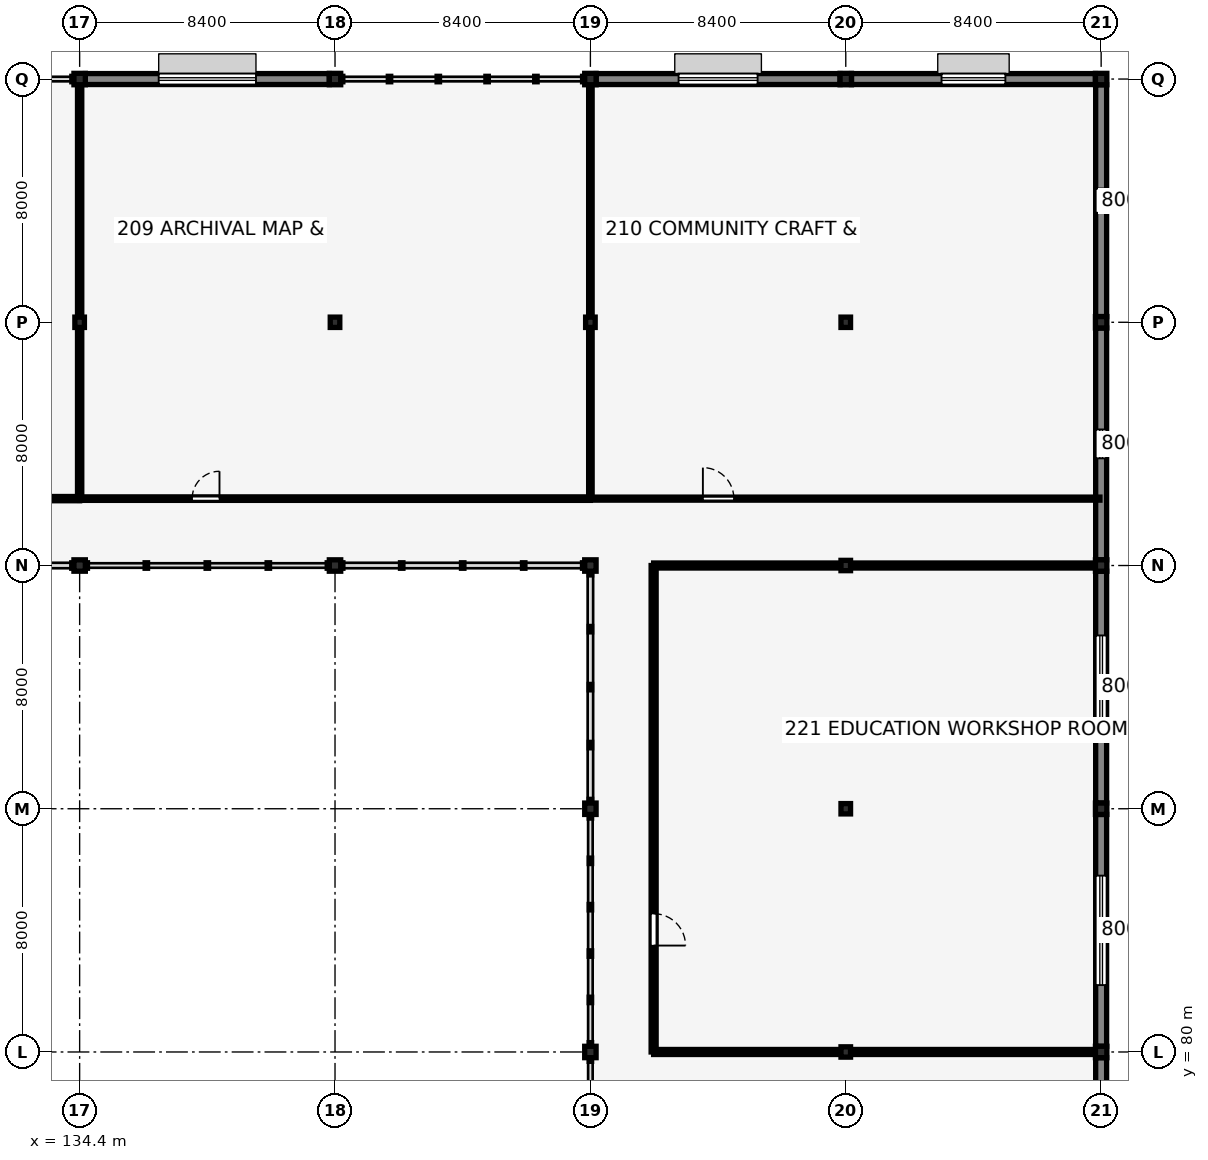
"""IFC4 building model, lengths in metres.
Left out: names, types, materials, properties, quantities, classifications, styles, units other than length and angle.
Written with IfcOpenShell. Run it as: python <this file> out.ifc"""

import sys

from ifc_helpers import new_model, si_unit, direction, frame, frame_2d, origin, origin_2d, place, context, subcontext, project, spatial, rectangle, i_section, extrude, element, fill, save


model = new_model("IFC4")
c1 = context("Model", 3, precision=1e-05, world=origin(), true_north=direction((0.0, 1.0)))
c2 = subcontext(c1, "Body", "Model", "MODEL_VIEW")
j1 = project(units=[si_unit("LENGTHUNIT", "METRE"), si_unit("PLANEANGLEUNIT", "RADIAN")], contexts=[c1])
p1 = place(None, origin())
s1 = spatial("IfcSite", under=j1, at=p1, CompositionType="ELEMENT")
p2 = place(p1, origin())
s2 = spatial("IfcBuilding", under=s1, at=p2, CompositionType="ELEMENT")
p3 = place(p2, frame((0.0, 0.0, 9.52)))
s3 = spatial("IfcBuildingStorey", under=s2, at=p3, CompositionType="ELEMENT", Elevation=9.52)
p4 = place(p3, frame((134.4, 96.0, 0.0), z_axis=(0.0, 0.0, 1.0), x_axis=(1.0, 0.0, 0.0)))
e1 = element("IfcColumn", 1, at=p4, inside=s3, PredefinedType="COLUMN", context=c2, shape_type="SweptSolid", body=[
    extrude(i_section(OverallWidth=0.375, OverallDepth=0.375, WebThickness=0.017, FlangeThickness=0.027, FilletRadius=0.015, at=origin_2d()), origin(), (0.0, 0.0, 1.0), 3.57),
])
p5 = place(p3, frame((134.4, 104.0, 0.0), z_axis=(0.0, 0.0, 1.0), x_axis=(1.0, 0.0, 0.0)))
e2 = element("IfcColumn", 2, at=p5, inside=s3, PredefinedType="COLUMN", context=c2, shape_type="SweptSolid", body=[
    extrude(i_section(OverallWidth=0.314, OverallDepth=0.34, WebThickness=0.019, FlangeThickness=0.031, FilletRadius=0.015, at=origin_2d()), origin(), (0.0, 0.0, 1.0), 3.57),
])
for number, where, z_axis, x_axis in (
    (3, (134.4, 112.0, 0.0), (0.0, 0.0, 1.0), (1.0, 0.0, 0.0)),
    (4, (142.8, 96.0, 0.0), (0.0, 0.0, 1.0), (1.0, 0.0, 0.0)),
):
    element("IfcColumn", number, at=place(p3, frame(where, z_axis=z_axis, x_axis=x_axis)), inside=s3, PredefinedType="COLUMN", context=c2, shape_type="SweptSolid", body=[
        extrude(i_section(OverallWidth=0.375, OverallDepth=0.375, WebThickness=0.017, FlangeThickness=0.027, FilletRadius=0.015, at=origin_2d()), origin(), (0.0, 0.0, 1.0), 3.57),
    ])
p6 = place(p3, frame((142.8, 104.0, 0.0), z_axis=(0.0, 0.0, 1.0), x_axis=(1.0, 0.0, 0.0)))
e5 = element("IfcColumn", 5, at=p6, inside=s3, PredefinedType="COLUMN", context=c2, shape_type="SweptSolid", body=[
    extrude(i_section(OverallWidth=0.314, OverallDepth=0.34, WebThickness=0.019, FlangeThickness=0.031, FilletRadius=0.015, at=origin_2d()), origin(), (0.0, 0.0, 1.0), 3.57),
])
for number, where, z_axis, x_axis in (
    (6, (142.8, 112.0, 0.0), (0.0, 0.0, 1.0), (1.0, 0.0, 0.0)),
    (7, (151.2, 80.0, 0.0), (0.0, 0.0, 1.0), (1.0, 0.0, 0.0)),
    (8, (151.2, 88.0, 0.0), (0.0, 0.0, 1.0), (1.0, 0.0, 0.0)),
    (9, (151.2, 96.0, 0.0), (0.0, 0.0, 1.0), (1.0, 0.0, 0.0)),
):
    element("IfcColumn", number, at=place(p3, frame(where, z_axis=z_axis, x_axis=x_axis)), inside=s3, PredefinedType="COLUMN", context=c2, shape_type="SweptSolid", body=[
        extrude(i_section(OverallWidth=0.375, OverallDepth=0.375, WebThickness=0.017, FlangeThickness=0.027, FilletRadius=0.015, at=origin_2d()), origin(), (0.0, 0.0, 1.0), 3.57),
    ])
p7 = place(p3, frame((151.2, 104.0, 0.0), z_axis=(0.0, 0.0, 1.0), x_axis=(1.0, 0.0, 0.0)))
e10 = element("IfcColumn", 10, at=p7, inside=s3, PredefinedType="COLUMN", context=c2, shape_type="SweptSolid", body=[
    extrude(i_section(OverallWidth=0.314, OverallDepth=0.34, WebThickness=0.019, FlangeThickness=0.031, FilletRadius=0.015, at=origin_2d()), origin(), (0.0, 0.0, 1.0), 3.57),
])
p8 = place(p3, frame((151.2, 112.0, 0.0), z_axis=(0.0, 0.0, 1.0), x_axis=(1.0, 0.0, 0.0)))
e11 = element("IfcColumn", 11, at=p8, inside=s3, PredefinedType="COLUMN", context=c2, shape_type="SweptSolid", body=[
    extrude(i_section(OverallWidth=0.375, OverallDepth=0.375, WebThickness=0.017, FlangeThickness=0.027, FilletRadius=0.015, at=origin_2d()), origin(), (0.0, 0.0, 1.0), 3.57),
])
for number, where, z_axis, x_axis in (
    (12, (159.6, 80.0, 0.0), (0.0, 0.0, 1.0), (1.0, 0.0, 0.0)),
    (13, (159.6, 88.0, 0.0), (0.0, 0.0, 1.0), (1.0, 0.0, 0.0)),
    (14, (159.6, 96.0, 0.0), (0.0, 0.0, 1.0), (1.0, 0.0, 0.0)),
    (15, (159.6, 104.0, 0.0), (0.0, 0.0, 1.0), (1.0, 0.0, 0.0)),
):
    element("IfcColumn", number, at=place(p3, frame(where, z_axis=z_axis, x_axis=x_axis)), inside=s3, PredefinedType="COLUMN", context=c2, shape_type="SweptSolid", body=[
        extrude(i_section(OverallWidth=0.314, OverallDepth=0.34, WebThickness=0.019, FlangeThickness=0.031, FilletRadius=0.015, at=origin_2d()), origin(), (0.0, 0.0, 1.0), 3.57),
    ])
for number, where, z_axis, x_axis in (
    (16, (159.6, 112.0, 0.0), (0.0, 0.0, 1.0), (1.0, 0.0, 0.0)),
    (17, (168.0, 80.0, 0.0), (0.0, 0.0, 1.0), (1.0, 0.0, 0.0)),
    (18, (168.0, 88.0, 0.0), (0.0, 0.0, 1.0), (1.0, 0.0, 0.0)),
    (19, (168.0, 96.0, 0.0), (0.0, 0.0, 1.0), (1.0, 0.0, 0.0)),
    (20, (168.0, 104.0, 0.0), (0.0, 0.0, 1.0), (1.0, 0.0, 0.0)),
    (21, (168.0, 112.0, 0.0), (0.0, 0.0, 1.0), (1.0, 0.0, 0.0)),
):
    element("IfcColumn", number, at=place(p3, frame(where, z_axis=z_axis, x_axis=x_axis)), inside=s3, PredefinedType="COLUMN", context=c2, shape_type="SweptSolid", body=[
        extrude(i_section(OverallWidth=0.375, OverallDepth=0.375, WebThickness=0.017, FlangeThickness=0.027, FilletRadius=0.015, at=origin_2d()), origin(), (0.0, 0.0, 1.0), 3.57),
    ])
p9 = place(p3, frame((134.587, 112.0, 0.0), z_axis=(0.0, 0.0, 1.0), x_axis=(1.0, 0.0, 0.0)))
e22 = element("IfcWall", 22, at=p9, inside=s3, PredefinedType="SOLIDWALL", context=c2, shape_type="SweptSolid", body=[
    extrude(rectangle(XDim=8.025, YDim=0.36, at=frame_2d((4.013, 0.0))), origin(), (0.0, 0.0, 1.0), 3.27),
])
p10 = place(p9, frame((2.413, 0.0, 1.55), z_axis=(0.0, 0.0, 1.0), x_axis=(1.0, 0.0, 0.0)))
e23 = element("IfcOpeningElement", 23, at=p10, cuts=e22, PredefinedType="OPENING", context=c2, shape_type="SweptSolid", body=[
    extrude(rectangle(XDim=3.2, YDim=0.9, at=frame_2d((1.6, 0.45))), frame((0.0, 0.19, 0.0), z_axis=(0.0, -1.0, 0.0), x_axis=(1.0, 0.0, 0.0)), (0.0, 0.0, 1.0), 0.38),
])
p11 = place(p3, frame((151.387, 112.0, 0.0), z_axis=(0.0, 0.0, 1.0), x_axis=(1.0, 0.0, 0.0)))
e24 = element("IfcWall", 24, at=p11, inside=s3, PredefinedType="SOLIDWALL", context=c2, shape_type="SweptSolid", body=[
    extrude(rectangle(XDim=8.025, YDim=0.36, at=frame_2d((4.013, 0.0))), origin(), (0.0, 0.0, 1.0), 3.27),
])
p12 = place(p11, frame((2.713, 0.0, 1.55), z_axis=(0.0, 0.0, 1.0), x_axis=(1.0, 0.0, 0.0)))
e25 = element("IfcOpeningElement", 25, at=p12, cuts=e24, PredefinedType="OPENING", context=c2, shape_type="SweptSolid", body=[
    extrude(rectangle(XDim=2.6, YDim=0.85, at=frame_2d((1.3, 0.425))), frame((0.0, 0.19, 0.0), z_axis=(0.0, -1.0, 0.0), x_axis=(1.0, 0.0, 0.0)), (0.0, 0.0, 1.0), 0.38),
])
p13 = place(p3, frame((159.787, 112.0, 0.0), z_axis=(0.0, 0.0, 1.0), x_axis=(1.0, 0.0, 0.0)))
e26 = element("IfcWall", 26, at=p13, inside=s3, PredefinedType="SOLIDWALL", context=c2, shape_type="SweptSolid", body=[
    extrude(rectangle(XDim=8.025, YDim=0.36, at=frame_2d((4.013, 0.0))), origin(), (0.0, 0.0, 1.0), 3.27),
])
p14 = place(p13, frame((2.963, 0.0, 1.55), z_axis=(0.0, 0.0, 1.0), x_axis=(1.0, 0.0, 0.0)))
e27 = element("IfcOpeningElement", 27, at=p14, cuts=e26, PredefinedType="OPENING", context=c2, shape_type="SweptSolid", body=[
    extrude(rectangle(XDim=2.1, YDim=0.8, at=frame_2d((1.05, 0.4))), frame((0.0, 0.19, 0.0), z_axis=(0.0, -1.0, 0.0), x_axis=(1.0, 0.0, 0.0)), (0.0, 0.0, 1.0), 0.38),
])
p15 = place(p3, frame((168.0, 96.187, 0.0), z_axis=(0.0, 0.0, 1.0), x_axis=(0.0, 1.0, 0.0)))
e28 = element("IfcWall", 28, at=p15, inside=s3, PredefinedType="SOLIDWALL", context=c2, shape_type="SweptSolid", body=[
    extrude(rectangle(XDim=7.625, YDim=0.36, at=frame_2d((3.813, 0.0))), origin(), (0.0, 0.0, 1.0), 3.219),
])
p16 = place(p15, frame((3.338, 0.0, 0.65), z_axis=(0.0, 0.0, 1.0), x_axis=(1.0, 0.0, 0.0)))
e29 = element("IfcOpeningElement", 29, at=p16, cuts=e28, PredefinedType="OPENING", context=c2, shape_type="SweptSolid", body=[
    extrude(rectangle(XDim=0.95, YDim=2.1, at=frame_2d((0.475, 1.05))), frame((0.0, 0.19, 0.0), z_axis=(0.0, -1.0, 0.0), x_axis=(1.0, 0.0, 0.0)), (0.0, 0.0, 1.0), 0.38),
])
p17 = place(p3, frame((168.0, 104.187, 0.0), z_axis=(0.0, 0.0, 1.0), x_axis=(0.0, 1.0, 0.0)))
e30 = element("IfcWall", 30, at=p17, inside=s3, PredefinedType="SOLIDWALL", context=c2, shape_type="SweptSolid", body=[
    extrude(rectangle(XDim=7.625, YDim=0.36, at=frame_2d((3.813, 0.0))), origin(), (0.0, 0.0, 1.0), 3.219),
])
p18 = place(p17, frame((3.413, 0.0, 0.65), z_axis=(0.0, 0.0, 1.0), x_axis=(1.0, 0.0, 0.0)))
e31 = element("IfcOpeningElement", 31, at=p18, cuts=e30, PredefinedType="OPENING", context=c2, shape_type="SweptSolid", body=[
    extrude(rectangle(XDim=0.8, YDim=1.85, at=frame_2d((0.4, 0.925))), frame((0.0, 0.19, 0.0), z_axis=(0.0, -1.0, 0.0), x_axis=(1.0, 0.0, 0.0)), (0.0, 0.0, 1.0), 0.38),
])
p19 = place(p3, frame((168.0, 72.187, 0.0), z_axis=(0.0, 0.0, 1.0), x_axis=(0.0, 1.0, 0.0)))
e32 = element("IfcWall", 32, at=p19, inside=s3, PredefinedType="SOLIDWALL", context=c2, shape_type="SweptSolid", body=[
    extrude(rectangle(XDim=7.625, YDim=0.36, at=frame_2d((3.813, 0.0))), origin(), (0.0, 0.0, 1.0), 3.27),
])
p20 = place(p3, frame((168.0, 80.187, 0.0), z_axis=(0.0, 0.0, 1.0), x_axis=(0.0, 1.0, 0.0)))
e33 = element("IfcWall", 33, at=p20, inside=s3, PredefinedType="SOLIDWALL", context=c2, shape_type="SweptSolid", body=[
    extrude(rectangle(XDim=7.625, YDim=0.36, at=frame_2d((3.813, 0.0))), origin(), (0.0, 0.0, 1.0), 3.219),
])
p21 = place(p20, frame((2.013, 0.0, 0.9), z_axis=(0.0, 0.0, 1.0), x_axis=(1.0, 0.0, 0.0)))
e34 = element("IfcOpeningElement", 34, at=p21, cuts=e33, PredefinedType="OPENING", context=c2, shape_type="SweptSolid", body=[
    extrude(rectangle(XDim=3.6, YDim=1.8, at=frame_2d((1.8, 0.9))), frame((0.0, 0.19, 0.0), z_axis=(0.0, -1.0, 0.0), x_axis=(1.0, 0.0, 0.0)), (0.0, 0.0, 1.0), 0.38),
])
p22 = place(p3, frame((168.0, 88.187, 0.0), z_axis=(0.0, 0.0, 1.0), x_axis=(0.0, 1.0, 0.0)))
e35 = element("IfcWall", 35, at=p22, inside=s3, PredefinedType="SOLIDWALL", context=c2, shape_type="SweptSolid", body=[
    extrude(rectangle(XDim=7.625, YDim=0.36, at=frame_2d((3.813, 0.0))), origin(), (0.0, 0.0, 1.0), 3.219),
])
p23 = place(p22, frame((2.113, 0.0, 0.9), z_axis=(0.0, 0.0, 1.0), x_axis=(1.0, 0.0, 0.0)))
e36 = element("IfcOpeningElement", 36, at=p23, cuts=e35, PredefinedType="OPENING", context=c2, shape_type="SweptSolid", body=[
    extrude(rectangle(XDim=3.4, YDim=1.7, at=frame_2d((1.7, 0.85))), frame((0.0, 0.19, 0.0), z_axis=(0.0, -1.0, 0.0), x_axis=(1.0, 0.0, 0.0)), (0.0, 0.0, 1.0), 0.38),
])
p24 = place(p3, frame((100.84, 98.2, 0.0), z_axis=(0.0, 0.0, 1.0), x_axis=(1.0, 0.0, 0.0)))
e37 = element("IfcWall", 37, at=p24, inside=s3, PredefinedType="PARTITIONING", context=c2, shape_type="SweptSolid", body=[
    extrude(rectangle(XDim=33.56, YDim=0.14, at=frame_2d((16.78, 0.0))), origin(), (0.0, 0.0, 1.0), 3.57),
])
p25 = place(p24, frame((3.66, 0.0, 0.0), z_axis=(0.0, 0.0, 1.0), x_axis=(1.0, 0.0, 0.0)))
e38 = element("IfcOpeningElement", 38, at=p25, cuts=e37, PredefinedType="OPENING", context=c2, shape_type="SweptSolid", body=[
    extrude(rectangle(XDim=1.1, YDim=2.2, at=frame_2d((0.55, 1.1))), frame((0.0, 0.08, 0.0), z_axis=(0.0, -1.0, 0.0), x_axis=(1.0, 0.0, 0.0)), (0.0, 0.0, 1.0), 0.16),
])
p26 = place(p3, frame((134.4, 98.2, 0.0), z_axis=(0.0, 0.0, 1.0), x_axis=(1.0, 0.0, 0.0)))
e39 = element("IfcWall", 39, at=p26, inside=s3, PredefinedType="PARTITIONING", context=c2, shape_type="SweptSolid", body=[
    extrude(rectangle(XDim=16.8, YDim=0.115, at=frame_2d((8.4, 0.0))), origin(), (0.0, 0.0, 1.0), 3.107),
])
p27 = place(p26, frame((3.7, 0.0, 0.0), z_axis=(0.0, 0.0, 1.0), x_axis=(1.0, 0.0, 0.0)))
e40 = element("IfcOpeningElement", 40, at=p27, cuts=e39, PredefinedType="OPENING", context=c2, shape_type="SweptSolid", body=[
    extrude(rectangle(XDim=0.9, YDim=2.1, at=frame_2d((0.45, 1.05))), frame((0.0, 0.067, 0.0), z_axis=(0.0, -1.0, 0.0), x_axis=(1.0, 0.0, 0.0)), (0.0, 0.0, 1.0), 0.135),
])
p28 = place(p3, frame((151.2, 98.2, 0.0), z_axis=(0.0, 0.0, 1.0), x_axis=(1.0, 0.0, 0.0)))
e41 = element("IfcWall", 41, at=p28, inside=s3, PredefinedType="PARTITIONING", context=c2, shape_type="SweptSolid", body=[
    extrude(rectangle(XDim=16.76, YDim=0.1, at=frame_2d((8.38, 0.0))), origin(), (0.0, 0.0, 1.0), 3.107),
])
p29 = place(p28, frame((3.7, 0.0, 0.0), z_axis=(0.0, 0.0, 1.0), x_axis=(1.0, 0.0, 0.0)))
e42 = element("IfcOpeningElement", 42, at=p29, cuts=e41, PredefinedType="OPENING", context=c2, shape_type="SweptSolid", body=[
    extrude(rectangle(XDim=1.02, YDim=2.16, at=frame_2d((0.51, 1.08))), frame((0.0, 0.06, 0.0), z_axis=(0.0, -1.0, 0.0), x_axis=(1.0, 0.0, 0.0)), (0.0, 0.0, 1.0), 0.12),
])
p30 = place(p3, frame((153.28, 80.0, 0.0), z_axis=(0.0, 0.0, 1.0), x_axis=(0.0, 1.0, 0.0)))
e43 = element("IfcWall", 43, at=p30, inside=s3, PredefinedType="PARTITIONING", context=c2, shape_type="SweptSolid", body=[
    extrude(rectangle(XDim=16.0, YDim=0.165, at=frame_2d((8.0, 0.0))), origin(), (0.0, 0.0, 1.0), 3.57),
])
p31 = place(p30, frame((4.55, 0.0, 0.0), z_axis=(0.0, 0.0, 1.0), x_axis=(-1.0, 0.0, 0.0)))
e44 = element("IfcOpeningElement", 44, at=p31, cuts=e43, PredefinedType="OPENING", context=c2, shape_type="SweptSolid", body=[
    extrude(rectangle(XDim=1.05, YDim=2.15, at=frame_2d((0.525, 1.075))), frame((0.0, 0.093, 0.0), z_axis=(0.0, -1.0, 0.0), x_axis=(1.0, 0.0, 0.0)), (0.0, 0.0, 1.0), 0.185),
])
p32 = place(p3, frame((134.4, 98.2, 0.0), z_axis=(0.0, 0.0, 1.0), x_axis=(0.0, 1.0, 0.0)))
e45 = element("IfcWall", 45, at=p32, inside=s3, PredefinedType="PARTITIONING", context=c2, shape_type="SweptSolid", body=[
    extrude(rectangle(XDim=5.64, YDim=0.14, at=frame_2d((2.82, 0.0))), origin(), (0.0, 0.0, 1.0), 3.107),
])
p33 = place(p3, frame((134.4, 104.16, 0.0), z_axis=(0.0, 0.0, 1.0), x_axis=(0.0, 1.0, 0.0)))
e46 = element("IfcWall", 46, at=p33, inside=s3, PredefinedType="PARTITIONING", context=c2, shape_type="SweptSolid", body=[
    extrude(rectangle(XDim=7.663, YDim=0.14, at=frame_2d((3.832, 0.0))), origin(), (0.0, 0.0, 1.0), 3.107),
])
p34 = place(p3, frame((151.2, 98.2, 0.0), z_axis=(0.0, 0.0, 1.0), x_axis=(0.0, 1.0, 0.0)))
e47 = element("IfcWall", 47, at=p34, inside=s3, PredefinedType="PARTITIONING", context=c2, shape_type="SweptSolid", body=[
    extrude(rectangle(XDim=5.64, YDim=0.115, at=frame_2d((2.82, 0.0))), origin(), (0.0, 0.0, 1.0), 3.107),
])
p35 = place(p3, frame((151.2, 104.16, 0.0), z_axis=(0.0, 0.0, 1.0), x_axis=(0.0, 1.0, 0.0)))
e48 = element("IfcWall", 48, at=p35, inside=s3, PredefinedType="PARTITIONING", context=c2, shape_type="SweptSolid", body=[
    extrude(rectangle(XDim=7.663, YDim=0.115, at=frame_2d((3.832, 0.0))), origin(), (0.0, 0.0, 1.0), 3.107),
])
p36 = place(p3, frame((153.28, 80.0, 0.0), z_axis=(0.0, 0.0, 1.0), x_axis=(1.0, 0.0, 0.0)))
e49 = element("IfcWall", 49, at=p36, inside=s3, PredefinedType="PARTITIONING", context=c2, shape_type="SweptSolid", body=[
    extrude(rectangle(XDim=6.173, YDim=0.165, at=frame_2d((3.086, 0.0))), origin(), (0.0, 0.0, 1.0), 3.037),
])
p37 = place(p3, frame((159.747, 80.0, 0.0), z_axis=(0.0, 0.0, 1.0), x_axis=(1.0, 0.0, 0.0)))
e50 = element("IfcWall", 50, at=p37, inside=s3, PredefinedType="PARTITIONING", context=c2, shape_type="SweptSolid", body=[
    extrude(rectangle(XDim=8.075, YDim=0.165, at=frame_2d((4.038, 0.0))), origin(), (0.0, 0.0, 1.0), 3.037),
])
p38 = place(p3, frame((153.28, 96.0, 0.0), z_axis=(0.0, 0.0, 1.0), x_axis=(1.0, 0.0, 0.0)))
e51 = element("IfcWall", 51, at=p38, inside=s3, PredefinedType="PARTITIONING", context=c2, shape_type="SweptSolid", body=[
    extrude(rectangle(XDim=6.173, YDim=0.165, at=frame_2d((3.086, 0.0))), origin(), (0.0, 0.0, 1.0), 3.037),
])
p39 = place(p3, frame((159.747, 96.0, 0.0), z_axis=(0.0, 0.0, 1.0), x_axis=(1.0, 0.0, 0.0)))
e52 = element("IfcWall", 52, at=p39, inside=s3, PredefinedType="PARTITIONING", context=c2, shape_type="SweptSolid", body=[
    extrude(rectangle(XDim=8.075, YDim=0.165, at=frame_2d((4.038, 0.0))), origin(), (0.0, 0.0, 1.0), 3.037),
])
p40 = place(p10, origin())
e53 = element("IfcWindow", 53, at=p40, inside=s3, PartitioningType="TRIPLE_PANEL_HORIZONTAL", PredefinedType="WINDOW", context=c2, shape_type="SweptSolid", body=[
    extrude(rectangle(XDim=3.2, YDim=0.9, at=frame_2d((1.6, 0.45))), frame((0.0, 0.03, 0.0), z_axis=(0.0, -1.0, 0.0), x_axis=(1.0, 0.0, 0.0)), (0.0, 0.0, 1.0), 0.06),
])
fill(e23, e53)
p41 = place(p12, origin())
e54 = element("IfcWindow", 54, at=p41, inside=s3, PartitioningType="DOUBLE_PANEL_HORIZONTAL", PredefinedType="WINDOW", context=c2, shape_type="SweptSolid", body=[
    extrude(rectangle(XDim=2.6, YDim=0.85, at=frame_2d((1.3, 0.425))), frame((0.0, 0.03, 0.0), z_axis=(0.0, -1.0, 0.0), x_axis=(1.0, 0.0, 0.0)), (0.0, 0.0, 1.0), 0.06),
])
fill(e25, e54)
p42 = place(p14, origin())
e55 = element("IfcWindow", 55, at=p42, inside=s3, PartitioningType="DOUBLE_PANEL_HORIZONTAL", PredefinedType="WINDOW", context=c2, shape_type="SweptSolid", body=[
    extrude(rectangle(XDim=2.1, YDim=0.8, at=frame_2d((1.05, 0.4))), frame((0.0, 0.03, 0.0), z_axis=(0.0, -1.0, 0.0), x_axis=(1.0, 0.0, 0.0)), (0.0, 0.0, 1.0), 0.06),
])
fill(e27, e55)
p43 = place(p16, origin())
e56 = element("IfcWindow", 56, at=p43, inside=s3, PartitioningType="SINGLE_PANEL", PredefinedType="WINDOW", context=c2, shape_type="SweptSolid", body=[
    extrude(rectangle(XDim=0.95, YDim=2.1, at=frame_2d((0.475, 1.05))), frame((0.0, 0.03, 0.0), z_axis=(0.0, -1.0, 0.0), x_axis=(1.0, 0.0, 0.0)), (0.0, 0.0, 1.0), 0.06),
])
fill(e29, e56)
p44 = place(p18, origin())
e57 = element("IfcWindow", 57, at=p44, inside=s3, PartitioningType="SINGLE_PANEL", PredefinedType="WINDOW", context=c2, shape_type="SweptSolid", body=[
    extrude(rectangle(XDim=0.8, YDim=1.85, at=frame_2d((0.4, 0.925))), frame((0.0, 0.03, 0.0), z_axis=(0.0, -1.0, 0.0), x_axis=(1.0, 0.0, 0.0)), (0.0, 0.0, 1.0), 0.06),
])
fill(e31, e57)
p45 = place(p21, origin())
e58 = element("IfcWindow", 58, at=p45, inside=s3, PartitioningType="TRIPLE_PANEL_VERTICAL", PredefinedType="WINDOW", context=c2, shape_type="SweptSolid", body=[
    extrude(rectangle(XDim=3.6, YDim=1.8, at=frame_2d((1.8, 0.9))), frame((0.0, 0.03, 0.0), z_axis=(0.0, -1.0, 0.0), x_axis=(1.0, 0.0, 0.0)), (0.0, 0.0, 1.0), 0.06),
])
fill(e34, e58)
p46 = place(p23, origin())
e59 = element("IfcWindow", 59, at=p46, inside=s3, PartitioningType="TRIPLE_PANEL_VERTICAL", PredefinedType="WINDOW", context=c2, shape_type="SweptSolid", body=[
    extrude(rectangle(XDim=3.4, YDim=1.7, at=frame_2d((1.7, 0.85))), frame((0.0, 0.03, 0.0), z_axis=(0.0, -1.0, 0.0), x_axis=(1.0, 0.0, 0.0)), (0.0, 0.0, 1.0), 0.06),
])
fill(e36, e59)
p47 = place(p27, origin())
e60 = element("IfcDoor", 60, at=p47, inside=s3, OperationType="SINGLE_SWING_RIGHT", PredefinedType="DOOR", context=c2, shape_type="SweptSolid", body=[
    extrude(rectangle(XDim=0.9, YDim=2.1, at=frame_2d((0.45, 1.05))), frame((0.0, 0.025, 0.0), z_axis=(0.0, -1.0, 0.0), x_axis=(1.0, 0.0, 0.0)), (0.0, 0.0, 1.0), 0.05),
])
fill(e40, e60)
p48 = place(p29, origin())
e61 = element("IfcDoor", 61, at=p48, inside=s3, OperationType="SINGLE_SWING_LEFT", PredefinedType="DOOR", context=c2, shape_type="SweptSolid", body=[
    extrude(rectangle(XDim=1.02, YDim=2.16, at=frame_2d((0.51, 1.08))), frame((0.0, 0.025, 0.0), z_axis=(0.0, -1.0, 0.0), x_axis=(1.0, 0.0, 0.0)), (0.0, 0.0, 1.0), 0.05),
])
fill(e42, e61)
p49 = place(p31, origin())
e62 = element("IfcDoor", 62, at=p49, inside=s3, OperationType="SINGLE_SWING_RIGHT", PredefinedType="DOOR", context=c2, shape_type="SweptSolid", body=[
    extrude(rectangle(XDim=1.05, YDim=2.15, at=frame_2d((0.525, 1.075))), frame((0.0, 0.025, 0.0), z_axis=(0.0, -1.0, 0.0), x_axis=(1.0, 0.0, 0.0)), (0.0, 0.0, 1.0), 0.05),
])
fill(e44, e62)
save(model, sys.argv[1])
